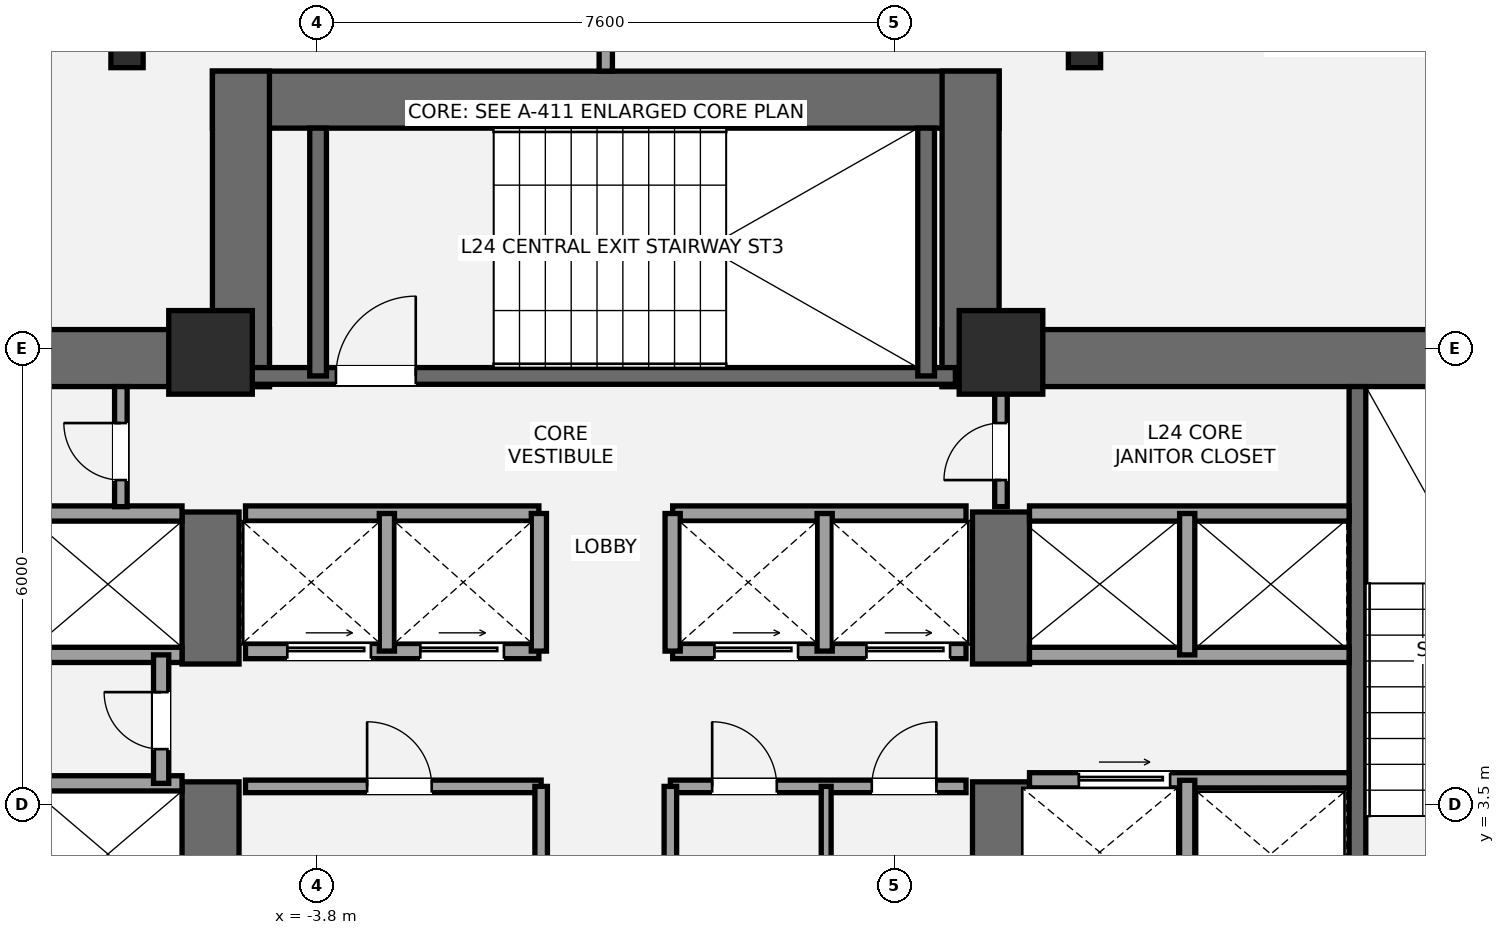
"""IFC4 building model, lengths in metres.
Left out: names, types, materials, properties, quantities, classifications, styles, units other than length and angle.
Written with IfcOpenShell. Run it as: python <this file> out.ifc"""

import sys

from ifc_helpers import new_model, si_unit, direction, frame, frame_2d, origin, origin_2d, place, context, subcontext, project, spatial, rectangle, i_section, extrude, element, fill, save


model = new_model("IFC4")
c1 = context("Model", 3, precision=1e-05, world=origin(), true_north=direction((0.0, 1.0)))
c2 = subcontext(c1, "Body", "Model", "MODEL_VIEW")
j1 = project(units=[si_unit("LENGTHUNIT", "METRE"), si_unit("PLANEANGLEUNIT", "RADIAN")], contexts=[c1])
p1 = place(None, origin())
s1 = spatial("IfcSite", under=j1, at=p1, CompositionType="ELEMENT")
p2 = place(p1, origin())
s2 = spatial("IfcBuilding", under=s1, at=p2, CompositionType="ELEMENT")
p3 = place(p2, frame((0.0, 0.0, 93.1)))
s3 = spatial("IfcBuildingStorey", under=s2, at=p3, CompositionType="ELEMENT", Elevation=93.1)
p4 = place(p3, frame((-13.9, 9.375, 0.0), z_axis=(0.0, 0.0, 1.0), x_axis=(1.0, 0.0, 0.0)))
e1 = element("IfcWall", 1, at=p4, inside=s3, PredefinedType="SHEAR", context=c2, shape_type="SweptSolid", body=[
    extrude(rectangle(XDim=9.475, YDim=0.75, at=frame_2d((4.737, 0.0))), origin(), (0.0, 0.0, 1.0), 3.5),
])
p5 = place(p3, frame((-5.2, 1.1, 0.0), z_axis=(0.0, 0.0, 1.0), x_axis=(0.0, 1.0, 0.0)))
e2 = element("IfcWall", 2, at=p5, inside=s3, PredefinedType="SHEAR", context=c2, shape_type="SweptSolid", body=[
    extrude(rectangle(XDim=2.7, YDim=0.75, at=frame_2d((1.35, 0.0))), origin(), (0.0, 0.0, 1.0), 3.5),
])
p6 = place(p3, frame((-5.2, 5.35, 0.0), z_axis=(0.0, 0.0, 1.0), x_axis=(0.0, 1.0, 0.0)))
e3 = element("IfcWall", 3, at=p6, inside=s3, PredefinedType="SHEAR", context=c2, shape_type="SweptSolid", body=[
    extrude(rectangle(XDim=2.0, YDim=0.75, at=frame_2d((1.0, 0.0))), origin(), (0.0, 0.0, 1.0), 3.5),
])
p7 = place(p3, frame((4.425, 9.375, 0.0), z_axis=(0.0, 0.0, 1.0), x_axis=(1.0, 0.0, 0.0)))
e4 = element("IfcWall", 4, at=p7, inside=s3, PredefinedType="SHEAR", context=c2, shape_type="SweptSolid", body=[
    extrude(rectangle(XDim=9.475, YDim=0.75, at=frame_2d((4.737, 0.0))), origin(), (0.0, 0.0, 1.0), 3.5),
])
p8 = place(p3, frame((5.2, 1.1, 0.0), z_axis=(0.0, 0.0, 1.0), x_axis=(0.0, 1.0, 0.0)))
e5 = element("IfcWall", 5, at=p8, inside=s3, PredefinedType="SHEAR", context=c2, shape_type="SweptSolid", body=[
    extrude(rectangle(XDim=2.7, YDim=0.75, at=frame_2d((1.35, 0.0))), origin(), (0.0, 0.0, 1.0), 3.5),
])
p9 = place(p3, frame((5.2, 5.35, 0.0), z_axis=(0.0, 0.0, 1.0), x_axis=(0.0, 1.0, 0.0)))
e6 = element("IfcWall", 6, at=p9, inside=s3, PredefinedType="SHEAR", context=c2, shape_type="SweptSolid", body=[
    extrude(rectangle(XDim=2.0, YDim=0.75, at=frame_2d((1.0, 0.0))), origin(), (0.0, 0.0, 1.0), 3.5),
])
p10 = place(p3, frame((9.89, 1.85, 0.0), z_axis=(0.0, 0.0, 1.0), x_axis=(0.0, 1.0, 0.0)))
e7 = element("IfcWall", 7, at=p10, inside=s3, PredefinedType="SHEAR", context=c2, shape_type="SweptSolid", body=[
    extrude(rectangle(XDim=7.15, YDim=0.22, at=frame_2d((3.575, 0.0))), origin(), (0.0, 0.0, 1.0), 3.5),
])
p11 = place(p3, frame((-5.175, 12.775, 0.0), z_axis=(0.0, 0.0, 1.0), x_axis=(1.0, 0.0, 0.0)))
e8 = element("IfcWall", 8, at=p11, inside=s3, PredefinedType="SHEAR", context=c2, shape_type="SweptSolid", body=[
    extrude(rectangle(XDim=10.35, YDim=0.75, at=frame_2d((5.175, 0.0))), origin(), (0.0, 0.0, 1.0), 3.5),
])
for number, where, z_axis, x_axis in (
    (9, (-4.8, 9.0, 0.0), (0.0, 0.0, 1.0), (0.0, 1.0, 0.0)),
    (10, (4.8, 9.0, 0.0), (0.0, 0.0, 1.0), (0.0, 1.0, 0.0)),
):
    element("IfcWall", number, at=place(p3, frame(where, z_axis=z_axis, x_axis=x_axis)), inside=s3, PredefinedType="SHEAR", context=c2, shape_type="SweptSolid", body=[
        extrude(rectangle(XDim=4.15, YDim=0.75, at=frame_2d((2.075, 0.0))), origin(), (0.0, 0.0, 1.0), 3.5),
    ])
p12 = place(p3, frame((-4.7, 9.14, 0.0), z_axis=(0.0, 0.0, 1.0), x_axis=(1.0, 0.0, 0.0)))
e11 = element("IfcWall", 11, at=p12, inside=s3, PredefinedType="SHEAR", context=c2, shape_type="SweptSolid", body=[
    extrude(rectangle(XDim=9.3, YDim=0.22, at=frame_2d((4.65, 0.0))), origin(), (0.0, 0.0, 1.0), 3.5),
])
p13 = place(p12, frame((1.15, 0.0, 0.0)))
e12 = element("IfcOpeningElement", 12, at=p13, cuts=e11, PredefinedType="OPENING", context=c2, shape_type="SweptSolid", body=[
    extrude(rectangle(XDim=1.05, YDim=2.15, at=frame_2d((0.525, 1.075))), frame((0.0, 0.12, 0.0), z_axis=(0.0, -1.0, 0.0), x_axis=(1.0, 0.0, 0.0)), (0.0, 0.0, 1.0), 0.24),
])
for number, where, z_axis, x_axis in (
    (13, (-3.785, 9.14, 0.0), (0.0, 0.0, 1.0), (0.0, 1.0, 0.0)),
    (14, (4.215, 9.14, 0.0), (0.0, 0.0, 1.0), (0.0, 1.0, 0.0)),
):
    element("IfcWall", number, at=place(p3, frame(where, z_axis=z_axis, x_axis=x_axis)), inside=s3, PredefinedType="SHEAR", context=c2, shape_type="SweptSolid", body=[
        extrude(rectangle(XDim=3.26, YDim=0.22, at=frame_2d((1.63, 0.0))), origin(), (0.0, 0.0, 1.0), 3.5),
    ])
for number, where, z_axis, x_axis in (
    (15, (-5.2, 9.45, 0.0), (0.0, 0.0, 1.0), (1.0, 0.0, 0.0)),
    (16, (5.2, 9.45, 0.0), (0.0, 0.0, 1.0), (1.0, 0.0, 0.0)),
):
    element("IfcColumn", number, at=place(p3, frame(where, z_axis=z_axis, x_axis=x_axis)), inside=s3, PredefinedType="COLUMN", context=c2, shape_type="SweptSolid", body=[
        extrude(rectangle(XDim=1.1, YDim=1.1, at=origin_2d()), origin(), (0.0, 0.0, 1.0), 3.5),
    ])
for number, where, z_axis, x_axis in (
    (17, (6.299, 13.433, 0.0), (0.0, 0.0, 1.0), (1.0, 0.0, 0.0)),
    (18, (-6.299, 13.433, 0.0), (0.0, 0.0, 1.0), (1.0, 0.0, 0.0)),
):
    element("IfcColumn", number, at=place(p3, frame(where, z_axis=z_axis, x_axis=x_axis)), inside=s3, PredefinedType="COLUMN", context=c2, shape_type="SweptSolid", body=[
        extrude(i_section(OverallWidth=0.424, OverallDepth=0.474, WebThickness=0.048, FlangeThickness=0.077, at=origin_2d()), origin(), (0.0, 0.0, 1.0), 3.5),
    ])
for number, where, z_axis, x_axis in (
    (19, (-9.78, 3.78, 0.0), (0.0, 0.0, 1.0), (1.0, 0.0, 0.0)),
    (20, (-9.78, 5.47, 0.0), (0.0, 0.0, 1.0), (1.0, 0.0, 0.0)),
    (21, (-9.78, 7.33, 0.0), (0.0, 0.0, 1.0), (1.0, 0.0, 0.0)),
):
    element("IfcWall", number, at=place(p3, frame(where, z_axis=z_axis, x_axis=x_axis)), inside=s3, PredefinedType="SOLIDWALL", context=c2, shape_type="SweptSolid", body=[
        extrude(rectangle(XDim=4.205, YDim=0.2, at=frame_2d((2.103, 0.0))), origin(), (0.0, 0.0, 1.0), 3.31),
    ])
p14 = place(p3, frame((-5.85, 3.78, 0.0), z_axis=(0.0, 0.0, 1.0), x_axis=(0.0, 1.0, 0.0)))
e22 = element("IfcWall", 22, at=p14, inside=s3, PredefinedType="SOLIDWALL", context=c2, shape_type="SweptSolid", body=[
    extrude(rectangle(XDim=1.69, YDim=0.2, at=frame_2d((0.845, 0.0))), origin(), (0.0, 0.0, 1.0), 3.31),
])
p15 = place(p14, frame((0.45, 0.0, 0.0)))
e23 = element("IfcOpeningElement", 23, at=p15, cuts=e22, PredefinedType="OPENING", context=c2, shape_type="SweptSolid", body=[
    extrude(rectangle(XDim=0.75, YDim=2.1, at=frame_2d((0.375, 1.05))), frame((0.0, 0.11, 0.0), z_axis=(0.0, -1.0, 0.0), x_axis=(1.0, 0.0, 0.0)), (0.0, 0.0, 1.0), 0.22),
])
p16 = place(p3, frame((5.575, 3.82, 0.0), z_axis=(0.0, 0.0, 1.0), x_axis=(1.0, 0.0, 0.0)))
e24 = element("IfcWall", 24, at=p16, inside=s3, PredefinedType="SOLIDWALL", context=c2, shape_type="SweptSolid", body=[
    extrude(rectangle(XDim=4.205, YDim=0.2, at=frame_2d((2.103, 0.0))), origin(), (0.0, 0.0, 1.0), 3.31),
])
p17 = place(p16, frame((0.65, 0.0, 0.0)))
e25 = element("IfcOpeningElement", 25, at=p17, cuts=e24, PredefinedType="OPENING", context=c2, shape_type="SweptSolid", body=[
    extrude(rectangle(XDim=1.2, YDim=2.2, at=frame_2d((0.6, 1.1))), frame((0.0, 0.11, 0.0), z_axis=(0.0, -1.0, 0.0), x_axis=(1.0, 0.0, 0.0)), (0.0, 0.0, 1.0), 0.22),
])
p18 = place(p3, frame((7.65, 1.85, 0.0), z_axis=(0.0, 0.0, 1.0), x_axis=(0.0, 1.0, 0.0)))
e26 = element("IfcWall", 26, at=p18, inside=s3, PredefinedType="SOLIDWALL", context=c2, shape_type="SweptSolid", body=[
    extrude(rectangle(XDim=1.97, YDim=0.2, at=frame_2d((0.985, 0.0))), origin(), (0.0, 0.0, 1.0), 3.31),
])
for number, where, z_axis, x_axis in (
    (27, (5.575, 5.47, 0.0), (0.0, 0.0, 1.0), (1.0, 0.0, 0.0)),
    (28, (5.575, 7.33, 0.0), (0.0, 0.0, 1.0), (1.0, 0.0, 0.0)),
):
    element("IfcWall", number, at=place(p3, frame(where, z_axis=z_axis, x_axis=x_axis)), inside=s3, PredefinedType="SOLIDWALL", context=c2, shape_type="SweptSolid", body=[
        extrude(rectangle(XDim=4.205, YDim=0.2, at=frame_2d((2.103, 0.0))), origin(), (0.0, 0.0, 1.0), 3.31),
    ])
p19 = place(p3, frame((7.65, 5.47, 0.0), z_axis=(0.0, 0.0, 1.0), x_axis=(0.0, 1.0, 0.0)))
e29 = element("IfcWall", 29, at=p19, inside=s3, PredefinedType="SOLIDWALL", context=c2, shape_type="SweptSolid", body=[
    extrude(rectangle(XDim=1.86, YDim=0.2, at=frame_2d((0.93, 0.0))), origin(), (0.0, 0.0, 1.0), 3.31),
])
p20 = place(p3, frame((-4.74, 3.74, 0.0), z_axis=(0.0, 0.0, 1.0), x_axis=(1.0, 0.0, 0.0)))
e30 = element("IfcWall", 30, at=p20, inside=s3, PredefinedType="PARTITIONING", context=c2, shape_type="SweptSolid", body=[
    extrude(rectangle(XDim=3.89, YDim=0.165, at=frame_2d((1.945, 0.0))), origin(), (0.0, 0.0, 1.0), 3.31),
])
p21 = place(p20, frame((1.6, 0.0, 0.0)))
e31 = element("IfcOpeningElement", 31, at=p21, cuts=e30, PredefinedType="OPENING", context=c2, shape_type="SweptSolid", body=[
    extrude(rectangle(XDim=0.85, YDim=2.1, at=frame_2d((0.425, 1.05))), frame((0.0, 0.093, 0.0), z_axis=(0.0, -1.0, 0.0), x_axis=(1.0, 0.0, 0.0)), (0.0, 0.0, 1.0), 0.185),
])
p22 = place(p3, frame((-0.85, 1.92, 0.0), z_axis=(0.0, 0.0, 1.0), x_axis=(0.0, 1.0, 0.0)))
e32 = element("IfcWall", 32, at=p22, inside=s3, PredefinedType="PARTITIONING", context=c2, shape_type="SweptSolid", body=[
    extrude(rectangle(XDim=1.82, YDim=0.165, at=frame_2d((0.91, 0.0))), origin(), (0.0, 0.0, 1.0), 3.31),
])
p23 = place(p3, frame((0.85, 3.74, 0.0), z_axis=(0.0, 0.0, 1.0), x_axis=(1.0, 0.0, 0.0)))
e33 = element("IfcWall", 33, at=p23, inside=s3, PredefinedType="PARTITIONING", context=c2, shape_type="SweptSolid", body=[
    extrude(rectangle(XDim=3.89, YDim=0.165, at=frame_2d((1.945, 0.0))), origin(), (0.0, 0.0, 1.0), 3.31),
])
p24 = place(p23, frame((0.55, 0.0, 0.0)))
e34 = element("IfcOpeningElement", 34, at=p24, cuts=e33, PredefinedType="OPENING", context=c2, shape_type="SweptSolid", body=[
    extrude(rectangle(XDim=0.85, YDim=2.1, at=frame_2d((0.425, 1.05))), frame((0.0, 0.093, 0.0), z_axis=(0.0, -1.0, 0.0), x_axis=(1.0, 0.0, 0.0)), (0.0, 0.0, 1.0), 0.185),
])
p25 = place(p23, frame((2.65, 0.0, 0.0)))
e35 = element("IfcOpeningElement", 35, at=p25, cuts=e33, PredefinedType="OPENING", context=c2, shape_type="SweptSolid", body=[
    extrude(rectangle(XDim=0.85, YDim=2.1, at=frame_2d((0.425, 1.05))), frame((0.0, 0.093, 0.0), z_axis=(0.0, -1.0, 0.0), x_axis=(1.0, 0.0, 0.0)), (0.0, 0.0, 1.0), 0.185),
])
p26 = place(p3, frame((0.85, 1.92, 0.0), z_axis=(0.0, 0.0, 1.0), x_axis=(0.0, 1.0, 0.0)))
e36 = element("IfcWall", 36, at=p26, inside=s3, PredefinedType="PARTITIONING", context=c2, shape_type="SweptSolid", body=[
    extrude(rectangle(XDim=1.82, YDim=0.165, at=frame_2d((0.91, 0.0))), origin(), (0.0, 0.0, 1.0), 3.31),
])
p27 = place(p3, frame((2.9, 1.92, 0.0), z_axis=(0.0, 0.0, 1.0), x_axis=(0.0, 1.0, 0.0)))
e37 = element("IfcWall", 37, at=p27, inside=s3, PredefinedType="PARTITIONING", context=c2, shape_type="SweptSolid", body=[
    extrude(rectangle(XDim=1.82, YDim=0.13, at=frame_2d((0.91, 0.0))), origin(), (0.0, 0.0, 1.0), 3.31),
])
p28 = place(p3, frame((-4.74, 5.52, 0.0), z_axis=(0.0, 0.0, 1.0), x_axis=(1.0, 0.0, 0.0)))
e38 = element("IfcWall", 38, at=p28, inside=s3, PredefinedType="SOLIDWALL", context=c2, shape_type="SweptSolid", body=[
    extrude(rectangle(XDim=3.86, YDim=0.2, at=frame_2d((1.93, 0.0))), origin(), (0.0, 0.0, 1.0), 3.31),
])
p29 = place(p28, frame((0.55, 0.0, 0.0)))
e39 = element("IfcOpeningElement", 39, at=p29, cuts=e38, PredefinedType="OPENING", context=c2, shape_type="SweptSolid", body=[
    extrude(rectangle(XDim=1.1, YDim=2.2, at=frame_2d((0.55, 1.1))), frame((0.0, 0.11, 0.0), z_axis=(0.0, -1.0, 0.0), x_axis=(1.0, 0.0, 0.0)), (0.0, 0.0, 1.0), 0.22),
])
p30 = place(p28, frame((2.3, 0.0, 0.0)))
e40 = element("IfcOpeningElement", 40, at=p30, cuts=e38, PredefinedType="OPENING", context=c2, shape_type="SweptSolid", body=[
    extrude(rectangle(XDim=1.1, YDim=2.2, at=frame_2d((0.55, 1.1))), frame((0.0, 0.11, 0.0), z_axis=(0.0, -1.0, 0.0), x_axis=(1.0, 0.0, 0.0)), (0.0, 0.0, 1.0), 0.22),
])
p31 = place(p3, frame((0.88, 5.52, 0.0), z_axis=(0.0, 0.0, 1.0), x_axis=(1.0, 0.0, 0.0)))
e41 = element("IfcWall", 41, at=p31, inside=s3, PredefinedType="SOLIDWALL", context=c2, shape_type="SweptSolid", body=[
    extrude(rectangle(XDim=3.86, YDim=0.2, at=frame_2d((1.93, 0.0))), origin(), (0.0, 0.0, 1.0), 3.31),
])
p32 = place(p31, frame((0.55, 0.0, 0.0)))
e42 = element("IfcOpeningElement", 42, at=p32, cuts=e41, PredefinedType="OPENING", context=c2, shape_type="SweptSolid", body=[
    extrude(rectangle(XDim=1.1, YDim=2.2, at=frame_2d((0.55, 1.1))), frame((0.0, 0.11, 0.0), z_axis=(0.0, -1.0, 0.0), x_axis=(1.0, 0.0, 0.0)), (0.0, 0.0, 1.0), 0.22),
])
p33 = place(p31, frame((2.55, 0.0, 0.0)))
e43 = element("IfcOpeningElement", 43, at=p33, cuts=e41, PredefinedType="OPENING", context=c2, shape_type="SweptSolid", body=[
    extrude(rectangle(XDim=1.1, YDim=2.2, at=frame_2d((0.55, 1.1))), frame((0.0, 0.11, 0.0), z_axis=(0.0, -1.0, 0.0), x_axis=(1.0, 0.0, 0.0)), (0.0, 0.0, 1.0), 0.22),
])
for number, where, z_axis, x_axis in (
    (44, (-4.74, 7.33, 0.0), (0.0, 0.0, 1.0), (1.0, 0.0, 0.0)),
    (45, (0.88, 7.33, 0.0), (0.0, 0.0, 1.0), (1.0, 0.0, 0.0)),
):
    element("IfcWall", number, at=place(p3, frame(where, z_axis=z_axis, x_axis=x_axis)), inside=s3, PredefinedType="SOLIDWALL", context=c2, shape_type="SweptSolid", body=[
        extrude(rectangle(XDim=3.86, YDim=0.2, at=frame_2d((1.93, 0.0))), origin(), (0.0, 0.0, 1.0), 3.31),
    ])
for number, where, z_axis, x_axis in (
    (46, (-2.88, 5.52, 0.0), (0.0, 0.0, 1.0), (0.0, 1.0, 0.0)),
    (47, (2.88, 5.52, 0.0), (0.0, 0.0, 1.0), (0.0, 1.0, 0.0)),
    (48, (-0.88, 5.52, 0.0), (0.0, 0.0, 1.0), (0.0, 1.0, 0.0)),
    (49, (0.88, 5.52, 0.0), (0.0, 0.0, 1.0), (0.0, 1.0, 0.0)),
):
    element("IfcWall", number, at=place(p3, frame(where, z_axis=z_axis, x_axis=x_axis)), inside=s3, PredefinedType="SOLIDWALL", context=c2, shape_type="SweptSolid", body=[
        extrude(rectangle(XDim=1.81, YDim=0.2, at=frame_2d((0.905, 0.0))), origin(), (0.0, 0.0, 1.0), 3.31),
    ])
p34 = place(p3, frame((-6.38, 7.42, 0.0), z_axis=(0.0, 0.0, 1.0), x_axis=(0.0, 1.0, 0.0)))
e50 = element("IfcWall", 50, at=p34, inside=s3, PredefinedType="PARTITIONING", context=c2, shape_type="SweptSolid", body=[
    extrude(rectangle(XDim=1.58, YDim=0.165, at=frame_2d((0.79, 0.0))), origin(), (0.0, 0.0, 1.0), 3.31),
])
p35 = place(p34, frame((0.35, 0.0, 0.0)))
e51 = element("IfcOpeningElement", 51, at=p35, cuts=e50, PredefinedType="OPENING", context=c2, shape_type="SweptSolid", body=[
    extrude(rectangle(XDim=0.75, YDim=2.1, at=frame_2d((0.375, 1.05))), frame((0.0, 0.093, 0.0), z_axis=(0.0, -1.0, 0.0), x_axis=(1.0, 0.0, 0.0)), (0.0, 0.0, 1.0), 0.185),
])
p36 = place(p3, frame((5.2, 7.42, 0.0), z_axis=(0.0, 0.0, 1.0), x_axis=(0.0, 1.0, 0.0)))
e52 = element("IfcWall", 52, at=p36, inside=s3, PredefinedType="PARTITIONING", context=c2, shape_type="SweptSolid", body=[
    extrude(rectangle(XDim=1.58, YDim=0.165, at=frame_2d((0.79, 0.0))), origin(), (0.0, 0.0, 1.0), 3.31),
])
p37 = place(p36, frame((0.35, 0.0, 0.0)))
e53 = element("IfcOpeningElement", 53, at=p37, cuts=e52, PredefinedType="OPENING", context=c2, shape_type="SweptSolid", body=[
    extrude(rectangle(XDim=0.75, YDim=2.1, at=frame_2d((0.375, 1.05))), frame((0.0, 0.093, 0.0), z_axis=(0.0, -1.0, 0.0), x_axis=(1.0, 0.0, 0.0)), (0.0, 0.0, 1.0), 0.185),
])
p38 = place(p3, frame((0.0, 13.15, 0.0), z_axis=(0.0, 0.0, 1.0), x_axis=(0.0, 1.0, 0.0)))
e54 = element("IfcWall", 54, at=p38, inside=s3, PredefinedType="PARTITIONING", context=c2, shape_type="SweptSolid", body=[
    extrude(rectangle(XDim=5.796, YDim=0.175, at=frame_2d((2.898, 0.0))), origin(), (0.0, 0.0, 1.0), 3.31),
])
p39 = place(p13, origin())
e55 = element("IfcDoor", 55, at=p39, inside=s3, OperationType="SINGLE_SWING_RIGHT", PredefinedType="DOOR", context=c2, shape_type="SweptSolid", body=[
    extrude(rectangle(XDim=1.05, YDim=2.15, at=frame_2d((0.525, 1.075))), frame((0.0, 0.025, 0.0), z_axis=(0.0, -1.0, 0.0), x_axis=(1.0, 0.0, 0.0)), (0.0, 0.0, 1.0), 0.05),
])
fill(e12, e55)
p40 = place(p15, origin())
e56 = element("IfcDoor", 56, at=p40, inside=s3, OperationType="SINGLE_SWING_RIGHT", PredefinedType="DOOR", context=c2, shape_type="SweptSolid", body=[
    extrude(rectangle(XDim=0.75, YDim=2.1, at=frame_2d((0.375, 1.05))), frame((0.0, 0.025, 0.0), z_axis=(0.0, -1.0, 0.0), x_axis=(1.0, 0.0, 0.0)), (0.0, 0.0, 1.0), 0.05),
])
fill(e23, e56)
p41 = place(p17, origin())
e57 = element("IfcDoor", 57, at=p41, inside=s3, OperationType="SLIDING_TO_RIGHT", PredefinedType="DOOR", context=c2, shape_type="SweptSolid", body=[
    extrude(rectangle(XDim=1.2, YDim=2.2, at=frame_2d((0.6, 1.1))), frame((0.0, 0.025, 0.0), z_axis=(0.0, -1.0, 0.0), x_axis=(1.0, 0.0, 0.0)), (0.0, 0.0, 1.0), 0.05),
])
fill(e25, e57)
p42 = place(p21, origin())
e58 = element("IfcDoor", 58, at=p42, inside=s3, OperationType="SINGLE_SWING_LEFT", PredefinedType="DOOR", context=c2, shape_type="SweptSolid", body=[
    extrude(rectangle(XDim=0.85, YDim=2.1, at=frame_2d((0.425, 1.05))), frame((0.0, 0.025, 0.0), z_axis=(0.0, -1.0, 0.0), x_axis=(1.0, 0.0, 0.0)), (0.0, 0.0, 1.0), 0.05),
])
fill(e31, e58)
p43 = place(p24, origin())
e59 = element("IfcDoor", 59, at=p43, inside=s3, OperationType="SINGLE_SWING_LEFT", PredefinedType="DOOR", context=c2, shape_type="SweptSolid", body=[
    extrude(rectangle(XDim=0.85, YDim=2.1, at=frame_2d((0.425, 1.05))), frame((0.0, 0.025, 0.0), z_axis=(0.0, -1.0, 0.0), x_axis=(1.0, 0.0, 0.0)), (0.0, 0.0, 1.0), 0.05),
])
fill(e34, e59)
p44 = place(p25, origin())
e60 = element("IfcDoor", 60, at=p44, inside=s3, OperationType="SINGLE_SWING_RIGHT", PredefinedType="DOOR", context=c2, shape_type="SweptSolid", body=[
    extrude(rectangle(XDim=0.85, YDim=2.1, at=frame_2d((0.425, 1.05))), frame((0.0, 0.025, 0.0), z_axis=(0.0, -1.0, 0.0), x_axis=(1.0, 0.0, 0.0)), (0.0, 0.0, 1.0), 0.05),
])
fill(e35, e60)
p45 = place(p29, origin())
e61 = element("IfcDoor", 61, at=p45, inside=s3, OperationType="SLIDING_TO_LEFT", PredefinedType="DOOR", context=c2, shape_type="SweptSolid", body=[
    extrude(rectangle(XDim=1.1, YDim=2.2, at=frame_2d((0.55, 1.1))), frame((0.0, 0.025, 0.0), z_axis=(0.0, -1.0, 0.0), x_axis=(1.0, 0.0, 0.0)), (0.0, 0.0, 1.0), 0.05),
])
fill(e39, e61)
p46 = place(p30, origin())
e62 = element("IfcDoor", 62, at=p46, inside=s3, OperationType="SLIDING_TO_LEFT", PredefinedType="DOOR", context=c2, shape_type="SweptSolid", body=[
    extrude(rectangle(XDim=1.1, YDim=2.2, at=frame_2d((0.55, 1.1))), frame((0.0, 0.025, 0.0), z_axis=(0.0, -1.0, 0.0), x_axis=(1.0, 0.0, 0.0)), (0.0, 0.0, 1.0), 0.05),
])
fill(e40, e62)
p47 = place(p32, origin())
e63 = element("IfcDoor", 63, at=p47, inside=s3, OperationType="SLIDING_TO_LEFT", PredefinedType="DOOR", context=c2, shape_type="SweptSolid", body=[
    extrude(rectangle(XDim=1.1, YDim=2.2, at=frame_2d((0.55, 1.1))), frame((0.0, 0.025, 0.0), z_axis=(0.0, -1.0, 0.0), x_axis=(1.0, 0.0, 0.0)), (0.0, 0.0, 1.0), 0.05),
])
fill(e42, e63)
p48 = place(p33, origin())
e64 = element("IfcDoor", 64, at=p48, inside=s3, OperationType="SLIDING_TO_LEFT", PredefinedType="DOOR", context=c2, shape_type="SweptSolid", body=[
    extrude(rectangle(XDim=1.1, YDim=2.2, at=frame_2d((0.55, 1.1))), frame((0.0, 0.025, 0.0), z_axis=(0.0, -1.0, 0.0), x_axis=(1.0, 0.0, 0.0)), (0.0, 0.0, 1.0), 0.05),
])
fill(e43, e64)
p49 = place(p35, origin())
e65 = element("IfcDoor", 65, at=p49, inside=s3, OperationType="SINGLE_SWING_RIGHT", PredefinedType="DOOR", context=c2, shape_type="SweptSolid", body=[
    extrude(rectangle(XDim=0.75, YDim=2.1, at=frame_2d((0.375, 1.05))), frame((0.0, 0.025, 0.0), z_axis=(0.0, -1.0, 0.0), x_axis=(1.0, 0.0, 0.0)), (0.0, 0.0, 1.0), 0.05),
])
fill(e51, e65)
p50 = place(p37, origin())
e66 = element("IfcDoor", 66, at=p50, inside=s3, OperationType="SINGLE_SWING_LEFT", PredefinedType="DOOR", context=c2, shape_type="SweptSolid", body=[
    extrude(rectangle(XDim=0.75, YDim=2.1, at=frame_2d((0.375, 1.05))), frame((0.0, 0.025, 0.0), z_axis=(0.0, -1.0, 0.0), x_axis=(1.0, 0.0, 0.0)), (0.0, 0.0, 1.0), 0.05),
])
fill(e53, e66)
save(model, sys.argv[1])
